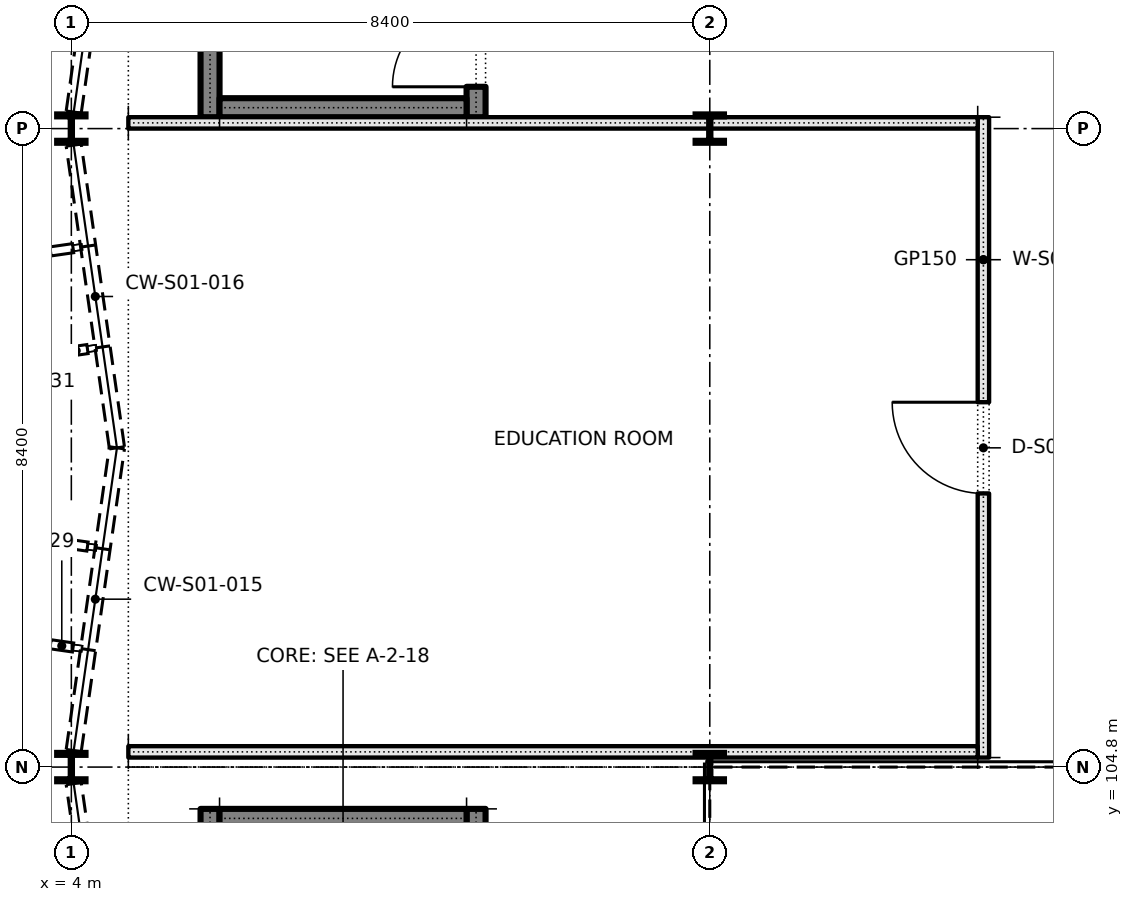
"""IFC4 building model, lengths in metres.
Left out: names, types, materials, properties, quantities, classifications, styles, units other than length and angle.
Written with IfcOpenShell. Run it as: python <this file> out.ifc"""

import sys

from ifc_helpers import new_model, si_unit, direction, frame, frame_2d, origin, origin_2d, place, context, subcontext, project, spatial, rectangle, i_section, extrude, element, fill, save


model = new_model("IFC4")
c1 = context("Model", 3, precision=1e-05, world=origin(), true_north=direction((0.0, 1.0)))
c2 = subcontext(c1, "Body", "Model", "MODEL_VIEW")
j1 = project(units=[si_unit("LENGTHUNIT", "METRE"), si_unit("PLANEANGLEUNIT", "RADIAN")], contexts=[c1])
p1 = place(None, origin())
s1 = spatial("IfcSite", under=j1, at=p1, CompositionType="ELEMENT")
p2 = place(p1, origin())
s2 = spatial("IfcBuilding", under=s1, at=p2, CompositionType="ELEMENT")
p3 = place(p2, frame((0.0, 0.0, 5.4)))
s3 = spatial("IfcBuildingStorey", under=s2, at=p3, CompositionType="ELEMENT", Elevation=5.4)
for number, where, z_axis, x_axis in (
    (1, (4.0, 104.8, 0.0), (0.0, 0.0, 1.0), (1.0, 0.0, 0.0)),
    (2, (4.0, 113.2, 0.0), (0.0, 0.0, 1.0), (1.0, 0.0, 0.0)),
    (3, (12.4, 104.8, 0.0), (0.0, 0.0, 1.0), (1.0, 0.0, 0.0)),
    (4, (12.4, 113.2, 0.0), (0.0, 0.0, 1.0), (1.0, 0.0, 0.0)),
):
    element("IfcColumn", number, at=place(p3, frame(where, z_axis=z_axis, x_axis=x_axis)), inside=s3, PredefinedType="COLUMN", context=c2, shape_type="SweptSolid", body=[
        extrude(i_section(OverallWidth=0.373, OverallDepth=0.373, WebThickness=0.016, FlangeThickness=0.026, FilletRadius=0.015, at=origin_2d()), origin(), (0.0, 0.0, 1.0), 4.8),
    ])
p4 = place(p3, frame((5.825, 96.55, 0.0), z_axis=(0.0, 0.0, 1.0), x_axis=(0.0, 1.0, 0.0)))
e5 = element("IfcWall", 5, at=p4, inside=s3, PredefinedType="SHEAR", context=c2, shape_type="SweptSolid", body=[
    extrude(rectangle(XDim=7.7, YDim=0.25, at=frame_2d((3.85, 0.0))), origin(), (0.0, 0.0, 1.0), 4.8),
])
p5 = place(p3, frame((9.325, 96.55, 0.0), z_axis=(0.0, 0.0, 1.0), x_axis=(0.0, 1.0, 0.0)))
e6 = element("IfcWall", 6, at=p5, inside=s3, PredefinedType="SHEAR", context=c2, shape_type="SweptSolid", body=[
    extrude(rectangle(XDim=7.7, YDim=0.25, at=frame_2d((3.85, 0.0))), origin(), (0.0, 0.0, 1.0), 4.8),
])
p6 = place(p5, frame((0.4, 0.0, 0.0)))
e7 = element("IfcOpeningElement", 7, at=p6, cuts=e6, PredefinedType="OPENING", context=c2, shape_type="SweptSolid", body=[
    extrude(rectangle(XDim=1.1, YDim=2.1, at=frame_2d((0.55, 1.05))), frame((0.0, 0.135, 0.0), z_axis=(0.0, -1.0, 0.0), x_axis=(1.0, 0.0, 0.0)), (0.0, 0.0, 1.0), 0.27),
])
p7 = place(p3, frame((5.95, 104.125, 0.0), z_axis=(0.0, 0.0, 1.0), x_axis=(1.0, 0.0, 0.0)))
e8 = element("IfcWall", 8, at=p7, inside=s3, PredefinedType="SHEAR", context=c2, shape_type="SweptSolid", body=[
    extrude(rectangle(XDim=3.25, YDim=0.25, at=frame_2d((1.625, 0.0))), origin(), (0.0, 0.0, 1.0), 4.8),
])
p8 = place(p3, frame((5.825, 113.35, 0.0), z_axis=(0.0, 0.0, 1.0), x_axis=(0.0, 1.0, 0.0)))
e9 = element("IfcWall", 9, at=p8, inside=s3, PredefinedType="SHEAR", context=c2, shape_type="SweptSolid", body=[
    extrude(rectangle(XDim=7.7, YDim=0.25, at=frame_2d((3.85, 0.0))), origin(), (0.0, 0.0, 1.0), 4.8),
])
p9 = place(p3, frame((9.325, 113.35, 0.0), z_axis=(0.0, 0.0, 1.0), x_axis=(0.0, 1.0, 0.0)))
e10 = element("IfcWall", 10, at=p9, inside=s3, PredefinedType="SHEAR", context=c2, shape_type="SweptSolid", body=[
    extrude(rectangle(XDim=7.7, YDim=0.25, at=frame_2d((3.85, 0.0))), origin(), (0.0, 0.0, 1.0), 4.8),
])
p10 = place(p9, frame((0.4, 0.0, 0.0)))
e11 = element("IfcOpeningElement", 11, at=p10, cuts=e10, PredefinedType="OPENING", context=c2, shape_type="SweptSolid", body=[
    extrude(rectangle(XDim=1.1, YDim=2.1, at=frame_2d((0.55, 1.05))), frame((0.0, 0.135, 0.0), z_axis=(0.0, -1.0, 0.0), x_axis=(1.0, 0.0, 0.0)), (0.0, 0.0, 1.0), 0.27),
])
p11 = place(p3, frame((5.95, 113.475, 0.0), z_axis=(0.0, 0.0, 1.0), x_axis=(1.0, 0.0, 0.0)))
e12 = element("IfcWall", 12, at=p11, inside=s3, PredefinedType="SHEAR", context=c2, shape_type="SweptSolid", body=[
    extrude(rectangle(XDim=3.25, YDim=0.25, at=frame_2d((1.625, 0.0))), origin(), (0.0, 0.0, 1.0), 4.8),
])
p12 = place(p3, frame((16.0, 104.925, 0.0), z_axis=(0.0, 0.0, 1.0), x_axis=(0.0, 1.0, 0.0)))
e13 = element("IfcWall", 13, at=p12, inside=s3, PredefinedType="PARTITIONING", context=c2, shape_type="SweptSolid", body=[
    extrude(rectangle(XDim=8.425, YDim=0.15, at=frame_2d((4.212, 0.0))), origin(), (0.0, 0.0, 1.0), 4.8),
])
p13 = place(p12, frame((3.475, 0.0, 0.0)))
e14 = element("IfcOpeningElement", 14, at=p13, cuts=e13, PredefinedType="OPENING", context=c2, shape_type="SweptSolid", body=[
    extrude(rectangle(XDim=1.2, YDim=2.1, at=frame_2d((0.6, 1.05))), frame((0.0, 0.085, 0.0), z_axis=(0.0, -1.0, 0.0), x_axis=(1.0, 0.0, 0.0)), (0.0, 0.0, 1.0), 0.17),
])
p14 = place(p3, frame((4.75, 105.0, 0.0), z_axis=(0.0, 0.0, 1.0), x_axis=(1.0, 0.0, 0.0)))
e15 = element("IfcWall", 15, at=p14, inside=s3, PredefinedType="PARTITIONING", context=c2, shape_type="SweptSolid", body=[
    extrude(rectangle(XDim=11.175, YDim=0.15, at=frame_2d((5.587, 0.0))), origin(), (0.0, 0.0, 1.0), 4.8),
])
p15 = place(p3, frame((4.75, 113.275, 0.0), z_axis=(0.0, 0.0, 1.0), x_axis=(1.0, 0.0, 0.0)))
e16 = element("IfcWall", 16, at=p15, inside=s3, PredefinedType="PARTITIONING", context=c2, shape_type="SweptSolid", body=[
    extrude(rectangle(XDim=11.175, YDim=0.15, at=frame_2d((5.587, 0.0))), origin(), (0.0, 0.0, 1.0), 4.008),
])
p16 = place(p10, origin())
e17 = element("IfcDoor", 17, at=p16, inside=s3, OperationType="SINGLE_SWING_LEFT", PredefinedType="DOOR", context=c2, shape_type="SweptSolid", body=[
    extrude(rectangle(XDim=1.1, YDim=2.1, at=frame_2d((0.55, 1.05))), frame((0.0, 0.025, 0.0), z_axis=(0.0, -1.0, 0.0), x_axis=(1.0, 0.0, 0.0)), (0.0, 0.0, 1.0), 0.05),
])
fill(e11, e17)
p17 = place(p13, origin())
e18 = element("IfcDoor", 18, at=p17, inside=s3, OperationType="SINGLE_SWING_RIGHT", PredefinedType="DOOR", context=c2, shape_type="SweptSolid", body=[
    extrude(rectangle(XDim=1.2, YDim=2.1, at=frame_2d((0.6, 1.05))), frame((0.0, 0.025, 0.0), z_axis=(0.0, -1.0, 0.0), x_axis=(1.0, 0.0, 0.0)), (0.0, 0.0, 1.0), 0.05),
])
fill(e14, e18)
save(model, sys.argv[1])
